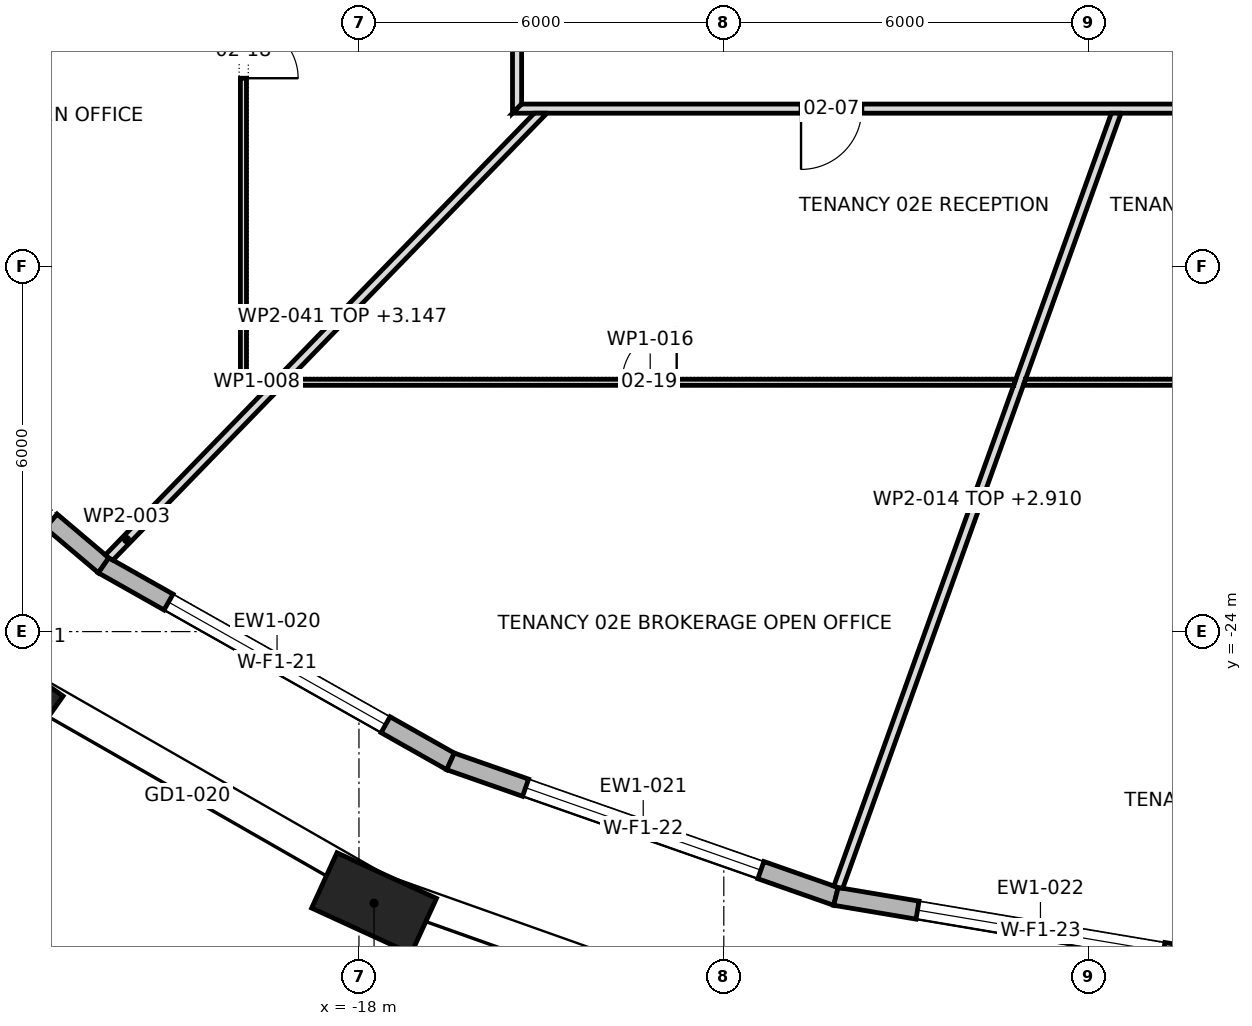
"""IFC4 building model, lengths in metres.
Left out: names, types, materials, properties, quantities, classifications, styles, units other than length and angle.
Written with IfcOpenShell. Run it as: python <this file> out.ifc"""

import sys

from ifc_helpers import new_model, si_unit, direction, frame, frame_2d, origin, origin_2d, place, context, subcontext, project, spatial, polyline, rectangle, outline, extrude, element, fill, save


model = new_model("IFC4")
c1 = context("Model", 3, precision=1e-05, world=origin(), true_north=direction((0.0, 1.0)))
c2 = subcontext(c1, "Body", "Model", "MODEL_VIEW")
j1 = project(units=[si_unit("LENGTHUNIT", "METRE"), si_unit("PLANEANGLEUNIT", "RADIAN")], contexts=[c1])
p1 = place(None, origin())
s1 = spatial("IfcSite", under=j1, at=p1, CompositionType="ELEMENT")
p2 = place(p1, origin())
s2 = spatial("IfcBuilding", under=s1, at=p2, CompositionType="ELEMENT")
p3 = place(p2, frame((0.0, 0.0, 36.1)))
s3 = spatial("IfcBuildingStorey", under=s2, at=p3, CompositionType="ELEMENT", Elevation=36.1)
for number, where, z_axis, x_axis in (
    (1, (-23.89, -24.951, 0.0), (0.0, 0.0, 1.0), (0.818, -0.575, 0.0)),
    (2, (-17.752, -28.467, 0.0), (0.0, 0.0, 1.0), (0.909, -0.417, 0.0)),
):
    element("IfcColumn", number, at=place(p3, frame(where, z_axis=z_axis, x_axis=x_axis)), inside=s3, PredefinedType="COLUMN", context=c2, shape_type="SweptSolid", body=[
        extrude(rectangle(XDim=1.8, YDim=1.0, at=origin_2d()), origin(), (0.0, 0.0, 1.0), 4.2),
    ])
p4 = place(p3, frame((-27.054, -18.806, 0.0), z_axis=(0.0, 0.0, 1.0), x_axis=(0.763577077796, -0.645716691951, 0.0)))
e3 = element("IfcWall", 3, at=p4, inside=s3, PredefinedType="STANDARD", context=c2, shape_type="SweptSolid", body=[
    extrude(outline(polyline([(-0.015, -0.15), (6.371, -0.15), (6.343, 0.15), (0.015, 0.15), (-0.015, -0.15)])), origin(), (0.0, 0.0, 1.0), 3.9),
])
p5 = place(p4, frame((1.129, 0.0, 0.0)))
e4 = element("IfcOpeningElement", 4, at=p5, cuts=e3, PredefinedType="OPENING", context=c2, shape_type="SweptSolid", body=[
    extrude(rectangle(XDim=4.1, YDim=3.45, at=frame_2d((2.05, 1.725))), frame((0.0, 0.162, 0.0), z_axis=(0.0, -1.0, 0.0), x_axis=(1.0, 0.0, 0.0)), (0.0, 0.0, 1.0), 0.324),
])
p6 = place(p3, frame((-22.2, -22.911, 0.0), z_axis=(0.0, 0.0, 1.0), x_axis=(0.87061279013, -0.491968870623, 0.0)))
e5 = element("IfcWall", 5, at=p6, inside=s3, PredefinedType="STANDARD", context=c2, shape_type="SweptSolid", body=[
    extrude(outline(polyline([(-0.014, -0.15), (6.567, -0.15), (6.54, 0.15), (0.014, 0.15), (-0.014, -0.15)])), origin(), (0.0, 0.0, 1.0), 3.9),
])
p7 = place(p6, frame((1.227, 0.0, 0.6)))
e6 = element("IfcOpeningElement", 6, at=p7, cuts=e5, PredefinedType="OPENING", context=c2, shape_type="SweptSolid", body=[
    extrude(rectangle(XDim=4.1, YDim=2.85, at=frame_2d((2.05, 1.425))), frame((0.0, 0.162, 0.0), z_axis=(0.0, -1.0, 0.0), x_axis=(1.0, 0.0, 0.0)), (0.0, 0.0, 1.0), 0.324),
])
p8 = place(p3, frame((-16.494, -26.135, 0.0), z_axis=(0.0, 0.0, 1.0), x_axis=(0.943778979427, -0.330577128657, 0.0)))
e7 = element("IfcWall", 7, at=p8, inside=s3, PredefinedType="STANDARD", context=c2, shape_type="SweptSolid", body=[
    extrude(outline(polyline([(-0.013, -0.15), (6.728, -0.15), (6.703, 0.15), (0.013, 0.15), (-0.013, -0.15)])), origin(), (0.0, 0.0, 1.0), 3.9),
])
p9 = place(p8, frame((1.308, 0.0, 0.6)))
e8 = element("IfcOpeningElement", 8, at=p9, cuts=e7, PredefinedType="OPENING", context=c2, shape_type="SweptSolid", body=[
    extrude(rectangle(XDim=4.1, YDim=2.85, at=frame_2d((2.05, 1.425))), frame((0.0, 0.162, 0.0), z_axis=(0.0, -1.0, 0.0), x_axis=(1.0, 0.0, 0.0)), (0.0, 0.0, 1.0), 0.324),
])
p10 = place(p3, frame((-10.156, -28.355, 0.0), z_axis=(0.0, 0.0, 1.0), x_axis=(0.986145179906, -0.165884550659, 0.0)))
e9 = element("IfcWall", 9, at=p10, inside=s3, PredefinedType="STANDARD", context=c2, shape_type="SweptSolid", body=[
    extrude(outline(polyline([(-0.013, -0.15), (6.834, -0.15), (6.809, 0.15), (0.013, 0.15), (-0.013, -0.15)])), origin(), (0.0, 0.0, 1.0), 3.9),
])
p11 = place(p10, frame((1.361, 0.0, 0.6)))
e10 = element("IfcOpeningElement", 10, at=p11, cuts=e9, PredefinedType="OPENING", context=c2, shape_type="SweptSolid", body=[
    extrude(rectangle(XDim=4.1, YDim=2.85, at=frame_2d((2.05, 1.425))), frame((0.0, 0.162, 0.0), z_axis=(0.0, -1.0, 0.0), x_axis=(1.0, 0.0, 0.0)), (0.0, 0.0, 1.0), 0.324),
])
p12 = place(p3, frame((-22.117, -22.791, 0.0), z_axis=(0.0, 0.0, 1.0), x_axis=(0.696550314682, 0.71750795056, 0.0)))
e11 = element("IfcWall", 11, at=p12, inside=s3, PredefinedType="PARTITIONING", context=c2, shape_type="SweptSolid", body=[
    extrude(outline(polyline([(0.0, 0.075), (0.0, 0.071), (0.005, 0.0), (0.025, -0.075), (0.839, -0.075), (0.839, 0.075), (0.0, 0.075)])), origin(), (0.0, 0.0, 1.0), 3.9),
])
p13 = place(p3, frame((-19.9, -19.95, 0.0), z_axis=(0.0, 0.0, 1.0), x_axis=(0.0, 1.0, 0.0)))
e12 = element("IfcWall", 12, at=p13, inside=s3, PredefinedType="PARTITIONING", context=c2, shape_type="SweptSolid", body=[
    extrude(outline(polyline([(10.9, -0.05), (10.9, -0.049), (10.892, -0.031), (10.883, -0.034), (10.845, 0.05), (9.038, 0.05), (7.23, 0.05), (5.423, 0.05), (3.615, 0.05), (1.808, 0.05), (0.0, 0.05), (0.1, -0.05), (0.1, -0.05), (1.9, -0.05), (3.7, -0.05), (5.5, -0.05), (7.3, -0.05), (9.1, -0.05), (10.9, -0.05)])), origin(), (0.0, 0.0, 1.0), 3.9),
])
p14 = place(p13, frame((5.05, 0.0, 0.0)))
e13 = element("IfcOpeningElement", 13, at=p14, cuts=e12, PredefinedType="OPENING", context=c2, shape_type="SweptSolid", body=[
    extrude(rectangle(XDim=0.9, YDim=2.1, at=frame_2d((0.45, 1.05))), frame((0.0, 0.062, 0.0), z_axis=(0.0, -1.0, 0.0), x_axis=(1.0, 0.0, 0.0)), (0.0, 0.0, 1.0), 0.124),
])
p15 = place(p3, frame((-19.46, -19.9, 0.0), z_axis=(0.0, 0.0, 1.0), x_axis=(-1.0, 0.0, 0.0)))
e14 = element("IfcWall", 14, at=p15, inside=s3, PredefinedType="PARTITIONING", context=c2, shape_type="SweptSolid", body=[
    extrude(outline(polyline([(0.0, -0.05), (0.39, -0.05), (0.49, 0.05), (0.0, 0.05), (0.0, -0.05)])), origin(), (0.0, 0.0, 1.0), 3.9),
])
p16 = place(p3, frame((-15.4, -15.475, 0.0), z_axis=(0.0, 0.0, 1.0), x_axis=(0.0, 1.0, 0.0)))
e15 = element("IfcWall", 15, at=p16, inside=s3, PredefinedType="PARTITIONING", context=c2, shape_type="SweptSolid", body=[
    extrude(outline(polyline([(0.15, -0.075), (2.066, -0.075), (3.981, -0.075), (5.897, -0.075), (7.812, -0.075), (9.728, -0.075), (11.644, -0.075), (13.56, -0.075), (15.475, -0.075), (17.391, -0.075), (19.306, -0.075), (21.222, -0.075), (23.138, -0.075), (25.053, -0.075), (26.969, -0.075), (28.885, -0.075), (30.8, -0.075), (30.95, 0.075), (29.016, 0.075), (27.081, 0.075), (25.147, 0.075), (23.212, 0.075), (21.278, 0.075), (19.344, 0.075), (17.409, 0.075), (15.475, 0.075), (13.541, 0.075), (11.606, 0.075), (9.672, 0.075), (7.738, 0.075), (5.803, 0.075), (3.869, 0.075), (1.935, 0.075), (0.0, 0.075), (0.15, -0.075)])), origin(), (0.0, 0.0, 1.0), 3.9),
])
p17 = place(p16, frame((28.02, 0.0, 0.0)))
e16 = element("IfcOpeningElement", 16, at=p17, cuts=e15, PredefinedType="OPENING", context=c2, shape_type="SweptSolid", body=[
    extrude(rectangle(XDim=1.0, YDim=2.1, at=frame_2d((0.5, 1.05))), frame((0.0, 0.087, 0.0), z_axis=(0.0, -1.0, 0.0), x_axis=(1.0, 0.0, 0.0)), (0.0, 0.0, 1.0), 0.174),
])
p18 = place(p16, frame((21.895, 0.0, 0.0)))
e17 = element("IfcOpeningElement", 17, at=p18, cuts=e15, PredefinedType="OPENING", context=c2, shape_type="SweptSolid", body=[
    extrude(rectangle(XDim=1.8, YDim=2.1, at=frame_2d((0.9, 1.05))), frame((0.0, 0.087, 0.0), z_axis=(0.0, -1.0, 0.0), x_axis=(1.0, 0.0, 0.0)), (0.0, 0.0, 1.0), 0.174),
])
p19 = place(p16, frame((15.798, 0.0, 0.0)))
e18 = element("IfcOpeningElement", 18, at=p19, cuts=e15, PredefinedType="OPENING", context=c2, shape_type="SweptSolid", body=[
    extrude(rectangle(XDim=1.8, YDim=2.1, at=frame_2d((0.9, 1.05))), frame((0.0, 0.087, 0.0), z_axis=(0.0, -1.0, 0.0), x_axis=(1.0, 0.0, 0.0)), (0.0, 0.0, 1.0), 0.174),
])
p20 = place(p16, frame((10.343, 0.0, 0.0)))
e19 = element("IfcOpeningElement", 19, at=p20, cuts=e15, PredefinedType="OPENING", context=c2, shape_type="SweptSolid", body=[
    extrude(rectangle(XDim=1.8, YDim=2.1, at=frame_2d((0.9, 1.05))), frame((0.0, 0.087, 0.0), z_axis=(0.0, -1.0, 0.0), x_axis=(1.0, 0.0, 0.0)), (0.0, 0.0, 1.0), 0.174),
])
p21 = place(p16, frame((3.795, 0.0, 0.0)))
e20 = element("IfcOpeningElement", 20, at=p21, cuts=e15, PredefinedType="OPENING", context=c2, shape_type="SweptSolid", body=[
    extrude(rectangle(XDim=1.0, YDim=2.1, at=frame_2d((0.5, 1.05))), frame((0.0, 0.087, 0.0), z_axis=(0.0, -1.0, 0.0), x_axis=(1.0, 0.0, 0.0)), (0.0, 0.0, 1.0), 0.174),
])
p22 = place(p3, frame((-15.475, -15.4, 0.0), z_axis=(0.0, 0.0, 1.0), x_axis=(1.0, 0.0, 0.0)))
e21 = element("IfcWall", 21, at=p22, inside=s3, PredefinedType="PARTITIONING", context=c2, shape_type="SweptSolid", body=[
    extrude(outline(polyline([(0.0, -0.075), (1.935, -0.075), (3.869, -0.075), (5.803, -0.075), (7.738, -0.075), (9.672, -0.075), (11.606, -0.075), (13.541, -0.075), (15.475, -0.075), (17.409, -0.075), (19.344, -0.075), (21.278, -0.075), (23.212, -0.075), (25.147, -0.075), (27.081, -0.075), (29.016, -0.075), (30.95, -0.075), (30.8, 0.075), (28.885, 0.075), (26.969, 0.075), (25.053, 0.075), (23.138, 0.075), (21.222, 0.075), (19.306, 0.075), (17.391, 0.075), (15.475, 0.075), (13.56, 0.075), (11.644, 0.075), (9.728, 0.075), (7.812, 0.075), (5.897, 0.075), (3.981, 0.075), (2.066, 0.075), (0.15, 0.075), (0.0, -0.075)])), origin(), (0.0, 0.0, 1.0), 3.9),
])
p23 = place(p22, frame((4.745, 0.0, 0.0)))
e22 = element("IfcOpeningElement", 22, at=p23, cuts=e21, PredefinedType="OPENING", context=c2, shape_type="SweptSolid", body=[
    extrude(rectangle(XDim=1.0, YDim=2.1, at=frame_2d((0.5, 1.05))), frame((0.0, 0.087, 0.0), z_axis=(0.0, -1.0, 0.0), x_axis=(1.0, 0.0, 0.0)), (0.0, 0.0, 1.0), 0.174),
])
p24 = place(p22, frame((13.11, 0.0, 0.0)))
e23 = element("IfcOpeningElement", 23, at=p24, cuts=e21, PredefinedType="OPENING", context=c2, shape_type="SweptSolid", body=[
    extrude(rectangle(XDim=1.0, YDim=2.1, at=frame_2d((0.5, 1.05))), frame((0.0, 0.087, 0.0), z_axis=(0.0, -1.0, 0.0), x_axis=(1.0, 0.0, 0.0)), (0.0, 0.0, 1.0), 0.174),
])
p25 = place(p22, frame((20.735, 0.0, 0.0)))
e24 = element("IfcOpeningElement", 24, at=p25, cuts=e21, PredefinedType="OPENING", context=c2, shape_type="SweptSolid", body=[
    extrude(rectangle(XDim=1.0, YDim=2.1, at=frame_2d((0.5, 1.05))), frame((0.0, 0.087, 0.0), z_axis=(0.0, -1.0, 0.0), x_axis=(1.0, 0.0, 0.0)), (0.0, 0.0, 1.0), 0.174),
])
p26 = place(p22, frame((27.54, 0.0, 0.0)))
e25 = element("IfcOpeningElement", 25, at=p26, cuts=e21, PredefinedType="OPENING", context=c2, shape_type="SweptSolid", body=[
    extrude(rectangle(XDim=1.0, YDim=2.1, at=frame_2d((0.5, 1.05))), frame((0.0, 0.087, 0.0), z_axis=(0.0, -1.0, 0.0), x_axis=(1.0, 0.0, 0.0)), (0.0, 0.0, 1.0), 0.174),
])
p27 = place(p3, frame((-10.119, -28.209, 0.0), z_axis=(0.0, 0.0, 1.0), x_axis=(0.337949016046, 0.941164418448, 0.0)))
e26 = element("IfcWall", 26, at=p27, inside=s3, PredefinedType="PARTITIONING", context=c2, shape_type="SweptSolid", body=[
    extrude(outline(polyline([(0.014, -0.075), (1.792, -0.075), (3.57, -0.075), (5.347, -0.075), (7.125, -0.075), (8.903, -0.075), (8.908, -0.073), (8.909, -0.075), (10.458, -0.075), (12.008, -0.075), (13.557, -0.075), (13.557, -0.074), (13.555, -0.069), (13.555, -0.069), (13.503, 0.075), (11.919, 0.075), (10.335, 0.075), (8.751, 0.075), (8.749, 0.074), (8.749, 0.075), (6.999, 0.075), (5.249, 0.075), (3.5, 0.075), (1.75, 0.075), (0.0, 0.075), (0.0, 0.071), (0.0, -0.0), (0.014, -0.075)])), origin(), (0.0, 0.0, 1.0), 2.91),
])
p28 = place(p3, frame((-7.198, -19.9, 0.0), z_axis=(0.0, 0.0, 1.0), x_axis=(-1.0, 0.0, 0.0)))
e27 = element("IfcWall", 27, at=p28, inside=s3, PredefinedType="PARTITIONING", context=c2, shape_type="SweptSolid", body=[
    extrude(outline(polyline([(0.0, -0.05), (1.993, -0.05), (3.986, -0.05), (5.979, -0.05), (7.972, -0.05), (9.965, -0.05), (11.958, -0.05), (12.055, 0.05), (12.055, 0.05), (10.338, 0.05), (8.621, 0.05), (6.904, 0.05), (5.187, 0.05), (3.47, 0.05), (1.753, 0.05), (0.035, 0.05), (0.0, -0.049), (0.0, -0.05)])), origin(), (0.0, 0.0, 1.0), 3.9),
])
p29 = place(p28, frame((5.577, 0.0, 0.0)))
e28 = element("IfcOpeningElement", 28, at=p29, cuts=e27, PredefinedType="OPENING", context=c2, shape_type="SweptSolid", body=[
    extrude(rectangle(XDim=0.9, YDim=2.1, at=frame_2d((0.45, 1.05))), frame((0.0, 0.062, 0.0), z_axis=(0.0, -1.0, 0.0), x_axis=(1.0, 0.0, 0.0)), (0.0, 0.0, 1.0), 0.124),
])
p30 = place(p3, frame((2.25, -19.9, 0.0), z_axis=(0.0, 0.0, 1.0), x_axis=(-1.0, 0.0, 0.0)))
e29 = element("IfcWall", 29, at=p30, inside=s3, PredefinedType="PARTITIONING", context=c2, shape_type="SweptSolid", body=[
    extrude(outline(polyline([(0.021, -0.05), (1.875, -0.05), (3.728, -0.05), (5.581, -0.05), (7.435, -0.05), (9.288, -0.05), (9.324, 0.05), (9.324, 0.05), (7.459, 0.05), (5.594, 0.05), (3.729, 0.05), (1.865, 0.05), (0.0, 0.05), (0.0, 0.047), (0.01, -0.041), (0.0, -0.042), (0.0, -0.043), (0.02, -0.041), (0.021, -0.05)])), origin(), (0.0, 0.0, 1.0), 3.9),
])
p31 = place(p30, frame((4.215, 0.0, 0.0)))
e30 = element("IfcOpeningElement", 30, at=p31, cuts=e29, PredefinedType="OPENING", context=c2, shape_type="SweptSolid", body=[
    extrude(rectangle(XDim=0.9, YDim=2.1, at=frame_2d((0.45, 1.05))), frame((0.0, 0.062, 0.0), z_axis=(0.0, -1.0, 0.0), x_axis=(1.0, 0.0, 0.0)), (0.0, 0.0, 1.0), 0.124),
])
p32 = place(p3, frame((-21.532, -22.189, 0.0), z_axis=(0.0, 0.0, 1.0), x_axis=(0.696649821167, 0.717411337148, 0.0)))
e31 = element("IfcWall", 31, at=p32, inside=s3, PredefinedType="PARTITIONING", context=c2, shape_type="SweptSolid", body=[
    extrude(outline(polyline([(0.0, -0.075), (1.664, -0.075), (3.328, -0.075), (3.331, -0.073), (3.333, -0.075), (4.857, -0.075), (6.382, -0.075), (7.906, -0.075), (9.431, -0.075), (9.431, -0.074), (9.338, 0.021), (9.338, 0.021), (9.286, 0.075), (7.727, 0.075), (6.169, 0.075), (4.611, 0.075), (3.052, 0.075), (3.05, 0.073), (3.048, 0.075), (1.524, 0.075), (0.0, 0.075), (0.0, -0.075)])), origin(), (0.0, 0.0, 1.0), 3.147),
])
p33 = place(p5, origin())
e32 = element("IfcDoor", 32, at=p33, inside=s3, OperationType="DOUBLE_DOOR_SLIDING", PredefinedType="DOOR", context=c2, shape_type="SweptSolid", body=[
    extrude(rectangle(XDim=4.1, YDim=3.45, at=frame_2d((2.05, 1.725))), frame((0.0, 0.025, 0.0), z_axis=(0.0, -1.0, 0.0), x_axis=(1.0, 0.0, 0.0)), (0.0, 0.0, 1.0), 0.05),
])
fill(e4, e32)
p34 = place(p7, origin())
e33 = element("IfcWindow", 33, at=p34, inside=s3, PartitioningType="TRIPLE_PANEL_VERTICAL", PredefinedType="WINDOW", context=c2, shape_type="SweptSolid", body=[
    extrude(rectangle(XDim=4.1, YDim=2.85, at=frame_2d((2.05, 1.425))), frame((0.0, 0.03, 0.0), z_axis=(0.0, -1.0, 0.0), x_axis=(1.0, 0.0, 0.0)), (0.0, 0.0, 1.0), 0.06),
])
fill(e6, e33)
p35 = place(p9, origin())
e34 = element("IfcWindow", 34, at=p35, inside=s3, PartitioningType="TRIPLE_PANEL_VERTICAL", PredefinedType="WINDOW", context=c2, shape_type="SweptSolid", body=[
    extrude(rectangle(XDim=4.1, YDim=2.85, at=frame_2d((2.05, 1.425))), frame((0.0, 0.03, 0.0), z_axis=(0.0, -1.0, 0.0), x_axis=(1.0, 0.0, 0.0)), (0.0, 0.0, 1.0), 0.06),
])
fill(e8, e34)
p36 = place(p11, origin())
e35 = element("IfcWindow", 35, at=p36, inside=s3, PartitioningType="TRIPLE_PANEL_VERTICAL", PredefinedType="WINDOW", context=c2, shape_type="SweptSolid", body=[
    extrude(rectangle(XDim=4.1, YDim=2.85, at=frame_2d((2.05, 1.425))), frame((0.0, 0.03, 0.0), z_axis=(0.0, -1.0, 0.0), x_axis=(1.0, 0.0, 0.0)), (0.0, 0.0, 1.0), 0.06),
])
fill(e10, e35)
p37 = place(p23, frame((1.0, 0.0, 0.0), z_axis=(0.0, 0.0, 1.0), x_axis=(-1.0, 0.0, 0.0)))
e36 = element("IfcDoor", 36, at=p37, inside=s3, OperationType="SINGLE_SWING_LEFT", PredefinedType="DOOR", context=c2, shape_type="SweptSolid", body=[
    extrude(rectangle(XDim=1.0, YDim=2.1, at=frame_2d((0.5, 1.05))), frame((0.0, 0.025, 0.0), z_axis=(0.0, -1.0, 0.0), x_axis=(1.0, 0.0, 0.0)), (0.0, 0.0, 1.0), 0.05),
])
fill(e22, e36)
p38 = place(p14, frame((0.9, 0.0, 0.0), z_axis=(0.0, 0.0, 1.0), x_axis=(-1.0, 0.0, 0.0)))
e37 = element("IfcDoor", 37, at=p38, inside=s3, OperationType="SINGLE_SWING_LEFT", PredefinedType="DOOR", context=c2, shape_type="SweptSolid", body=[
    extrude(rectangle(XDim=0.9, YDim=2.1, at=frame_2d((0.45, 1.05))), frame((0.0, 0.025, 0.0), z_axis=(0.0, -1.0, 0.0), x_axis=(1.0, 0.0, 0.0)), (0.0, 0.0, 1.0), 0.05),
])
fill(e13, e37)
p39 = place(p29, frame((0.9, 0.0, 0.0), z_axis=(0.0, 0.0, 1.0), x_axis=(-1.0, 0.0, 0.0)))
e38 = element("IfcDoor", 38, at=p39, inside=s3, OperationType="SINGLE_SWING_LEFT", PredefinedType="DOOR", context=c2, shape_type="SweptSolid", body=[
    extrude(rectangle(XDim=0.9, YDim=2.1, at=frame_2d((0.45, 1.05))), frame((0.0, 0.025, 0.0), z_axis=(0.0, -1.0, 0.0), x_axis=(1.0, 0.0, 0.0)), (0.0, 0.0, 1.0), 0.05),
])
fill(e28, e38)
save(model, sys.argv[1])
